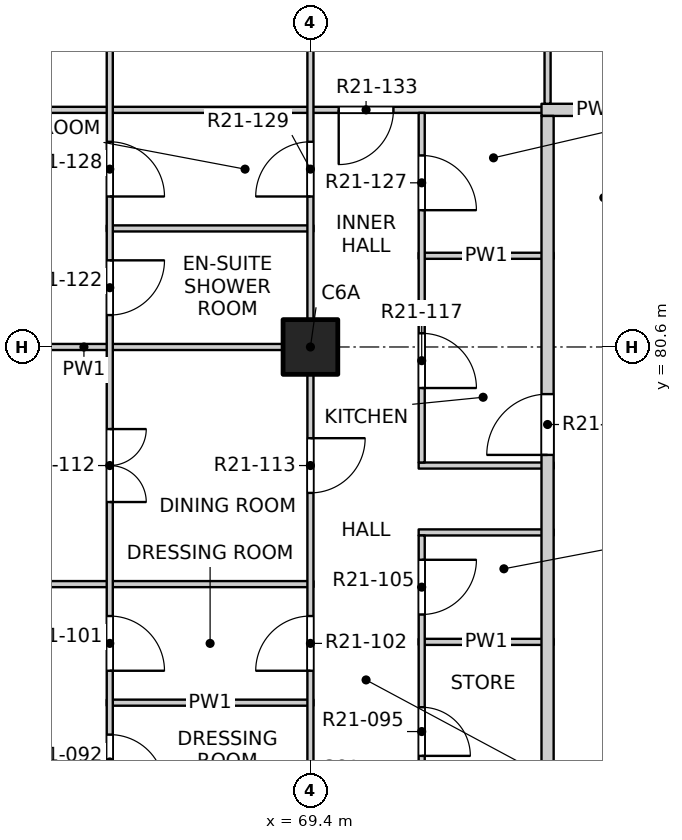
"""IFC4 building model, lengths in metres.
Left out: names, types, materials, properties, quantities, classifications, styles, units other than length and angle.
Written with IfcOpenShell. Run it as: python <this file> out.ifc"""

import sys

from ifc_helpers import new_model, si_unit, direction, frame, frame_2d, origin, origin_2d, place, context, subcontext, project, spatial, rectangle, extrude, element, fill, save


model = new_model("IFC4")
c1 = context("Model", 3, precision=1e-05, world=origin(), true_north=direction((0.0, 1.0)))
c2 = subcontext(c1, "Body", "Model", "MODEL_VIEW")
j1 = project(units=[si_unit("LENGTHUNIT", "METRE"), si_unit("PLANEANGLEUNIT", "RADIAN")], contexts=[c1])
p1 = place(None, origin())
s1 = spatial("IfcSite", under=j1, at=p1, CompositionType="ELEMENT")
p2 = place(p1, origin())
s2 = spatial("IfcBuilding", under=s1, at=p2, CompositionType="ELEMENT")
p3 = place(p2, frame((0.0, 0.0, 214.3)))
s3 = spatial("IfcBuildingStorey", under=s2, at=p3, CompositionType="ELEMENT", Elevation=214.3)
p4 = place(p3, frame((69.4, 80.6, -0.25), z_axis=(0.0, 0.0, 1.0), x_axis=(1.0, 0.0, 0.0)))
e1 = element("IfcColumn", 1, at=p4, inside=s3, PredefinedType="COLUMN", context=c2, shape_type="SweptSolid", body=[
    extrude(rectangle(XDim=0.9, YDim=0.9, at=origin_2d()), origin(), (0.0, 0.0, 1.0), 3.4),
])
p5 = place(p3, frame((66.05, 74.75, 0.0), z_axis=(0.0, 0.0, 1.0), x_axis=(1.0, 0.0, 0.0)))
e2 = element("IfcWall", 2, at=p5, inside=s3, PredefinedType="PARTITIONING", context=c2, shape_type="SweptSolid", body=[
    extrude(rectangle(XDim=3.4, YDim=0.1, at=frame_2d((1.7, 0.0))), origin(), (0.0, 0.0, 1.0), 3.15),
])
p6 = place(p3, frame((71.18, 75.75, 0.0), z_axis=(0.0, 0.0, 1.0), x_axis=(1.0, 0.0, 0.0)))
e3 = element("IfcWall", 3, at=p6, inside=s3, PredefinedType="PARTITIONING", context=c2, shape_type="SweptSolid", body=[
    extrude(rectangle(XDim=2.22, YDim=0.1, at=frame_2d((1.11, 0.0))), origin(), (0.0, 0.0, 1.0), 3.15),
])
p7 = place(p3, frame((61.9, 76.7, 0.0), z_axis=(0.0, 0.0, 1.0), x_axis=(1.0, 0.0, 0.0)))
e4 = element("IfcWall", 4, at=p7, inside=s3, PredefinedType="PARTITIONING", context=c2, shape_type="SweptSolid", body=[
    extrude(rectangle(XDim=7.55, YDim=0.1, at=frame_2d((3.775, 0.0))), origin(), (0.0, 0.0, 1.0), 2.55),
])
for number, where, z_axis, x_axis in (
    (5, (71.18, 77.55, 0.0), (0.0, 0.0, 1.0), (1.0, 0.0, 0.0)),
    (6, (71.18, 78.65, 0.0), (0.0, 0.0, 1.0), (1.0, 0.0, 0.0)),
):
    element("IfcWall", number, at=place(p3, frame(where, z_axis=z_axis, x_axis=x_axis)), inside=s3, PredefinedType="PARTITIONING", context=c2, shape_type="SweptSolid", body=[
        extrude(rectangle(XDim=2.22, YDim=0.1, at=frame_2d((1.11, 0.0))), origin(), (0.0, 0.0, 1.0), 3.15),
    ])
p8 = place(p3, frame((61.9, 80.6, 0.0), z_axis=(0.0, 0.0, 1.0), x_axis=(1.0, 0.0, 0.0)))
e7 = element("IfcWall", 7, at=p8, inside=s3, PredefinedType="PARTITIONING", context=c2, shape_type="SweptSolid", body=[
    extrude(rectangle(XDim=7.55, YDim=0.1, at=frame_2d((3.775, 0.0))), origin(), (0.0, 0.0, 1.0), 3.15),
])
p9 = place(p3, frame((71.18, 82.1, 0.0), z_axis=(0.0, 0.0, 1.0), x_axis=(1.0, 0.0, 0.0)))
e8 = element("IfcWall", 8, at=p9, inside=s3, PredefinedType="PARTITIONING", context=c2, shape_type="SweptSolid", body=[
    extrude(rectangle(XDim=2.22, YDim=0.1, at=frame_2d((1.11, 0.0))), origin(), (0.0, 0.0, 1.0), 3.15),
])
p10 = place(p3, frame((66.05, 82.55, 0.0), z_axis=(0.0, 0.0, 1.0), x_axis=(1.0, 0.0, 0.0)))
e9 = element("IfcWall", 9, at=p10, inside=s3, PredefinedType="PARTITIONING", context=c2, shape_type="SweptSolid", body=[
    extrude(rectangle(XDim=3.4, YDim=0.1, at=frame_2d((1.7, 0.0))), origin(), (0.0, 0.0, 1.0), 3.15),
])
p11 = place(p3, frame((61.9, 84.5, 0.0), z_axis=(0.0, 0.0, 1.0), x_axis=(1.0, 0.0, 0.0)))
e10 = element("IfcWall", 10, at=p11, inside=s3, PredefinedType="PARTITIONING", context=c2, shape_type="SweptSolid", body=[
    extrude(rectangle(XDim=11.5, YDim=0.1, at=frame_2d((5.75, 0.0))), origin(), (0.0, 0.0, 1.0), 3.15),
])
p12 = place(p11, frame((7.965, 0.0, 0.0)))
e11 = element("IfcOpeningElement", 11, at=p12, cuts=e10, PredefinedType="OPENING", context=c2, shape_type="SweptSolid", body=[
    extrude(rectangle(XDim=0.9, YDim=2.1, at=frame_2d((0.45, 1.05))), frame((0.0, 0.06, 0.0), z_axis=(0.0, -1.0, 0.0), x_axis=(1.0, 0.0, 0.0)), (0.0, 0.0, 1.0), 0.12),
])
p13 = place(p3, frame((73.2, 84.5, 0.0), z_axis=(0.0, 0.0, 1.0), x_axis=(1.0, 0.0, 0.0)))
e12 = element("IfcWall", 12, at=p13, inside=s3, PredefinedType="PARTITIONING", context=c2, shape_type="SweptSolid", body=[
    extrude(rectangle(XDim=1.85, YDim=0.2, at=frame_2d((0.925, 0.0))), origin(), (0.0, 0.0, 1.0), 3.15),
])
p14 = place(p3, frame((66.1, 61.2, 0.0), z_axis=(0.0, 0.0, 1.0), x_axis=(0.0, 1.0, 0.0)))
e13 = element("IfcWall", 13, at=p14, inside=s3, PredefinedType="PARTITIONING", context=c2, shape_type="SweptSolid", body=[
    extrude(rectangle(XDim=26.9, YDim=0.1, at=frame_2d((13.45, 0.0))), origin(), (0.0, 0.0, 1.0), 3.15),
])
p15 = place(p14, frame((1.25, 0.0, 0.0)))
e14 = element("IfcOpeningElement", 14, at=p15, cuts=e13, PredefinedType="OPENING", context=c2, shape_type="SweptSolid", body=[
    extrude(rectangle(XDim=1.2, YDim=2.1, at=frame_2d((0.6, 1.05))), frame((0.0, 0.06, 0.0), z_axis=(0.0, -1.0, 0.0), x_axis=(1.0, 0.0, 0.0)), (0.0, 0.0, 1.0), 0.12),
])
p16 = place(p14, frame((5.15, 0.0, 0.0)))
e15 = element("IfcOpeningElement", 15, at=p16, cuts=e13, PredefinedType="OPENING", context=c2, shape_type="SweptSolid", body=[
    extrude(rectangle(XDim=1.2, YDim=2.1, at=frame_2d((0.6, 1.05))), frame((0.0, 0.06, 0.0), z_axis=(0.0, -1.0, 0.0), x_axis=(1.0, 0.0, 0.0)), (0.0, 0.0, 1.0), 0.12),
])
p17 = place(p14, frame((8.225, 0.0, 0.0)))
e16 = element("IfcOpeningElement", 16, at=p17, cuts=e13, PredefinedType="OPENING", context=c2, shape_type="SweptSolid", body=[
    extrude(rectangle(XDim=0.9, YDim=2.1, at=frame_2d((0.45, 1.05))), frame((0.0, 0.06, 0.0), z_axis=(0.0, -1.0, 0.0), x_axis=(1.0, 0.0, 0.0)), (0.0, 0.0, 1.0), 0.12),
])
p18 = place(p14, frame((10.175, 0.0, 0.0)))
e17 = element("IfcOpeningElement", 17, at=p18, cuts=e13, PredefinedType="OPENING", context=c2, shape_type="SweptSolid", body=[
    extrude(rectangle(XDim=0.9, YDim=2.1, at=frame_2d((0.45, 1.05))), frame((0.0, 0.06, 0.0), z_axis=(0.0, -1.0, 0.0), x_axis=(1.0, 0.0, 0.0)), (0.0, 0.0, 1.0), 0.12),
])
p19 = place(p14, frame((12.125, 0.0, 0.0)))
e18 = element("IfcOpeningElement", 18, at=p19, cuts=e13, PredefinedType="OPENING", context=c2, shape_type="SweptSolid", body=[
    extrude(rectangle(XDim=0.9, YDim=2.1, at=frame_2d((0.45, 1.05))), frame((0.0, 0.06, 0.0), z_axis=(0.0, -1.0, 0.0), x_axis=(1.0, 0.0, 0.0)), (0.0, 0.0, 1.0), 0.12),
])
p20 = place(p14, frame((14.075, 0.0, 0.0)))
e19 = element("IfcOpeningElement", 19, at=p20, cuts=e13, PredefinedType="OPENING", context=c2, shape_type="SweptSolid", body=[
    extrude(rectangle(XDim=0.9, YDim=2.1, at=frame_2d((0.45, 1.05))), frame((0.0, 0.06, 0.0), z_axis=(0.0, -1.0, 0.0), x_axis=(1.0, 0.0, 0.0)), (0.0, 0.0, 1.0), 0.12),
])
p21 = place(p14, frame((16.85, 0.0, 0.0)))
e20 = element("IfcOpeningElement", 20, at=p21, cuts=e13, PredefinedType="OPENING", context=c2, shape_type="SweptSolid", body=[
    extrude(rectangle(XDim=1.2, YDim=2.1, at=frame_2d((0.6, 1.05))), frame((0.0, 0.06, 0.0), z_axis=(0.0, -1.0, 0.0), x_axis=(1.0, 0.0, 0.0)), (0.0, 0.0, 1.0), 0.12),
])
p22 = place(p14, frame((19.925, 0.0, 0.0)))
e21 = element("IfcOpeningElement", 21, at=p22, cuts=e13, PredefinedType="OPENING", context=c2, shape_type="SweptSolid", body=[
    extrude(rectangle(XDim=0.9, YDim=2.1, at=frame_2d((0.45, 1.05))), frame((0.0, 0.06, 0.0), z_axis=(0.0, -1.0, 0.0), x_axis=(1.0, 0.0, 0.0)), (0.0, 0.0, 1.0), 0.12),
])
p23 = place(p14, frame((21.875, 0.0, 0.0)))
e22 = element("IfcOpeningElement", 22, at=p23, cuts=e13, PredefinedType="OPENING", context=c2, shape_type="SweptSolid", body=[
    extrude(rectangle(XDim=0.9, YDim=2.1, at=frame_2d((0.45, 1.05))), frame((0.0, 0.06, 0.0), z_axis=(0.0, -1.0, 0.0), x_axis=(1.0, 0.0, 0.0)), (0.0, 0.0, 1.0), 0.12),
])
p24 = place(p14, frame((24.65, 0.0, 0.0)))
e23 = element("IfcOpeningElement", 23, at=p24, cuts=e13, PredefinedType="OPENING", context=c2, shape_type="SweptSolid", body=[
    extrude(rectangle(XDim=1.2, YDim=2.1, at=frame_2d((0.6, 1.05))), frame((0.0, 0.06, 0.0), z_axis=(0.0, -1.0, 0.0), x_axis=(1.0, 0.0, 0.0)), (0.0, 0.0, 1.0), 0.12),
])
p25 = place(p3, frame((69.4, 41.9, 0.0), z_axis=(0.0, 0.0, 1.0), x_axis=(0.0, 1.0, 0.0)))
e24 = element("IfcWall", 24, at=p25, inside=s3, PredefinedType="PARTITIONING", context=c2, shape_type="SweptSolid", body=[
    extrude(rectangle(XDim=46.2, YDim=0.1, at=frame_2d((23.1, 0.0))), origin(), (0.0, 0.0, 1.0), 3.15),
])
p26 = place(p25, frame((1.2, 0.0, 0.0)))
e25 = element("IfcOpeningElement", 25, at=p26, cuts=e24, PredefinedType="OPENING", context=c2, shape_type="SweptSolid", body=[
    extrude(rectangle(XDim=0.9, YDim=2.1, at=frame_2d((0.45, 1.05))), frame((0.0, 0.06, 0.0), z_axis=(0.0, -1.0, 0.0), x_axis=(1.0, 0.0, 0.0)), (0.0, 0.0, 1.0), 0.12),
])
p27 = place(p25, frame((6.025, 0.0, 0.0)))
e26 = element("IfcOpeningElement", 26, at=p27, cuts=e24, PredefinedType="OPENING", context=c2, shape_type="SweptSolid", body=[
    extrude(rectangle(XDim=0.9, YDim=2.1, at=frame_2d((0.45, 1.05))), frame((0.0, 0.06, 0.0), z_axis=(0.0, -1.0, 0.0), x_axis=(1.0, 0.0, 0.0)), (0.0, 0.0, 1.0), 0.12),
])
p28 = place(p25, frame((9.0, 0.0, 0.0)))
e27 = element("IfcOpeningElement", 27, at=p28, cuts=e24, PredefinedType="OPENING", context=c2, shape_type="SweptSolid", body=[
    extrude(rectangle(XDim=0.9, YDim=2.1, at=frame_2d((0.45, 1.05))), frame((0.0, 0.06, 0.0), z_axis=(0.0, -1.0, 0.0), x_axis=(1.0, 0.0, 0.0)), (0.0, 0.0, 1.0), 0.12),
])
p29 = place(p25, frame((12.9, 0.0, 0.0)))
e28 = element("IfcOpeningElement", 28, at=p29, cuts=e24, PredefinedType="OPENING", context=c2, shape_type="SweptSolid", body=[
    extrude(rectangle(XDim=0.9, YDim=2.1, at=frame_2d((0.45, 1.05))), frame((0.0, 0.06, 0.0), z_axis=(0.0, -1.0, 0.0), x_axis=(1.0, 0.0, 0.0)), (0.0, 0.0, 1.0), 0.12),
])
p30 = place(p25, frame((17.775, 0.0, 0.0)))
e29 = element("IfcOpeningElement", 29, at=p30, cuts=e24, PredefinedType="OPENING", context=c2, shape_type="SweptSolid", body=[
    extrude(rectangle(XDim=0.9, YDim=2.1, at=frame_2d((0.45, 1.05))), frame((0.0, 0.06, 0.0), z_axis=(0.0, -1.0, 0.0), x_axis=(1.0, 0.0, 0.0)), (0.0, 0.0, 1.0), 0.12),
])
p31 = place(p25, frame((20.7, 0.0, 0.0)))
e30 = element("IfcOpeningElement", 30, at=p31, cuts=e24, PredefinedType="OPENING", context=c2, shape_type="SweptSolid", body=[
    extrude(rectangle(XDim=0.9, YDim=2.1, at=frame_2d((0.45, 1.05))), frame((0.0, 0.06, 0.0), z_axis=(0.0, -1.0, 0.0), x_axis=(1.0, 0.0, 0.0)), (0.0, 0.0, 1.0), 0.12),
])
p32 = place(p25, frame((24.6, 0.0, 0.0)))
e31 = element("IfcOpeningElement", 31, at=p32, cuts=e24, PredefinedType="OPENING", context=c2, shape_type="SweptSolid", body=[
    extrude(rectangle(XDim=0.9, YDim=2.1, at=frame_2d((0.45, 1.05))), frame((0.0, 0.06, 0.0), z_axis=(0.0, -1.0, 0.0), x_axis=(1.0, 0.0, 0.0)), (0.0, 0.0, 1.0), 0.12),
])
p33 = place(p25, frame((29.425, 0.0, 0.0)))
e32 = element("IfcOpeningElement", 32, at=p33, cuts=e24, PredefinedType="OPENING", context=c2, shape_type="SweptSolid", body=[
    extrude(rectangle(XDim=0.9, YDim=2.1, at=frame_2d((0.45, 1.05))), frame((0.0, 0.06, 0.0), z_axis=(0.0, -1.0, 0.0), x_axis=(1.0, 0.0, 0.0)), (0.0, 0.0, 1.0), 0.12),
])
p34 = place(p25, frame((33.375, 0.0, 0.0)))
e33 = element("IfcOpeningElement", 33, at=p34, cuts=e24, PredefinedType="OPENING", context=c2, shape_type="SweptSolid", body=[
    extrude(rectangle(XDim=0.9, YDim=2.1, at=frame_2d((0.45, 1.05))), frame((0.0, 0.06, 0.0), z_axis=(0.0, -1.0, 0.0), x_axis=(1.0, 0.0, 0.0)), (0.0, 0.0, 1.0), 0.12),
])
p35 = place(p25, frame((36.3, 0.0, 0.0)))
e34 = element("IfcOpeningElement", 34, at=p35, cuts=e24, PredefinedType="OPENING", context=c2, shape_type="SweptSolid", body=[
    extrude(rectangle(XDim=0.9, YDim=2.1, at=frame_2d((0.45, 1.05))), frame((0.0, 0.06, 0.0), z_axis=(0.0, -1.0, 0.0), x_axis=(1.0, 0.0, 0.0)), (0.0, 0.0, 1.0), 0.12),
])
p36 = place(p25, frame((41.175, 0.0, 0.0)))
e35 = element("IfcOpeningElement", 35, at=p36, cuts=e24, PredefinedType="OPENING", context=c2, shape_type="SweptSolid", body=[
    extrude(rectangle(XDim=0.9, YDim=2.1, at=frame_2d((0.45, 1.05))), frame((0.0, 0.06, 0.0), z_axis=(0.0, -1.0, 0.0), x_axis=(1.0, 0.0, 0.0)), (0.0, 0.0, 1.0), 0.12),
])
p37 = place(p25, frame((44.1, 0.0, 0.0)))
e36 = element("IfcOpeningElement", 36, at=p37, cuts=e24, PredefinedType="OPENING", context=c2, shape_type="SweptSolid", body=[
    extrude(rectangle(XDim=0.9, YDim=2.1, at=frame_2d((0.45, 1.05))), frame((0.0, 0.06, 0.0), z_axis=(0.0, -1.0, 0.0), x_axis=(1.0, 0.0, 0.0)), (0.0, 0.0, 1.0), 0.12),
])
p38 = place(p3, frame((71.23, 68.25, 0.0), z_axis=(0.0, 0.0, 1.0), x_axis=(0.0, 1.0, 0.0)))
e37 = element("IfcWall", 37, at=p38, inside=s3, PredefinedType="PARTITIONING", context=c2, shape_type="SweptSolid", body=[
    extrude(rectangle(XDim=9.25, YDim=0.1, at=frame_2d((4.625, 0.0))), origin(), (0.0, 0.0, 1.0), 3.15),
])
p39 = place(p38, frame((0.625, 0.0, 0.0)))
e38 = element("IfcOpeningElement", 38, at=p39, cuts=e37, PredefinedType="OPENING", context=c2, shape_type="SweptSolid", body=[
    extrude(rectangle(XDim=0.9, YDim=2.1, at=frame_2d((0.45, 1.05))), frame((0.0, 0.06, 0.0), z_axis=(0.0, -1.0, 0.0), x_axis=(1.0, 0.0, 0.0)), (0.0, 0.0, 1.0), 0.12),
])
p40 = place(p38, frame((2.975, 0.0, 0.0)))
e39 = element("IfcOpeningElement", 39, at=p40, cuts=e37, PredefinedType="OPENING", context=c2, shape_type="SweptSolid", body=[
    extrude(rectangle(XDim=0.8, YDim=2.1, at=frame_2d((0.4, 1.05))), frame((0.0, 0.06, 0.0), z_axis=(0.0, -1.0, 0.0), x_axis=(1.0, 0.0, 0.0)), (0.0, 0.0, 1.0), 0.12),
])
p41 = place(p38, frame((5.625, 0.0, 0.0)))
e40 = element("IfcOpeningElement", 40, at=p41, cuts=e37, PredefinedType="OPENING", context=c2, shape_type="SweptSolid", body=[
    extrude(rectangle(XDim=0.8, YDim=2.1, at=frame_2d((0.4, 1.05))), frame((0.0, 0.06, 0.0), z_axis=(0.0, -1.0, 0.0), x_axis=(1.0, 0.0, 0.0)), (0.0, 0.0, 1.0), 0.12),
])
p42 = place(p38, frame((7.95, 0.0, 0.0)))
e41 = element("IfcOpeningElement", 41, at=p42, cuts=e37, PredefinedType="OPENING", context=c2, shape_type="SweptSolid", body=[
    extrude(rectangle(XDim=0.9, YDim=2.1, at=frame_2d((0.45, 1.05))), frame((0.0, 0.06, 0.0), z_axis=(0.0, -1.0, 0.0), x_axis=(1.0, 0.0, 0.0)), (0.0, 0.0, 1.0), 0.12),
])
p43 = place(p3, frame((71.23, 78.7, 0.0), z_axis=(0.0, 0.0, 1.0), x_axis=(0.0, 1.0, 0.0)))
e42 = element("IfcWall", 42, at=p43, inside=s3, PredefinedType="PARTITIONING", context=c2, shape_type="SweptSolid", body=[
    extrude(rectangle(XDim=5.75, YDim=0.1, at=frame_2d((2.875, 0.0))), origin(), (0.0, 0.0, 1.0), 3.15),
])
p44 = place(p43, frame((1.225, 0.0, 0.0)))
e43 = element("IfcOpeningElement", 43, at=p44, cuts=e42, PredefinedType="OPENING", context=c2, shape_type="SweptSolid", body=[
    extrude(rectangle(XDim=0.9, YDim=2.1, at=frame_2d((0.45, 1.05))), frame((0.0, 0.06, 0.0), z_axis=(0.0, -1.0, 0.0), x_axis=(1.0, 0.0, 0.0)), (0.0, 0.0, 1.0), 0.12),
])
p45 = place(p43, frame((4.15, 0.0, 0.0)))
e44 = element("IfcOpeningElement", 44, at=p45, cuts=e42, PredefinedType="OPENING", context=c2, shape_type="SweptSolid", body=[
    extrude(rectangle(XDim=0.9, YDim=2.1, at=frame_2d((0.45, 1.05))), frame((0.0, 0.06, 0.0), z_axis=(0.0, -1.0, 0.0), x_axis=(1.0, 0.0, 0.0)), (0.0, 0.0, 1.0), 0.12),
])
p46 = place(p3, frame((73.3, 49.5, 0.0), z_axis=(0.0, 0.0, 1.0), x_axis=(0.0, 1.0, 0.0)))
e45 = element("IfcWall", 45, at=p46, inside=s3, PredefinedType="PARTITIONING", context=c2, shape_type="SweptSolid", body=[
    extrude(rectangle(XDim=34.9, YDim=0.2, at=frame_2d((17.45, 0.0))), origin(), (0.0, 0.0, 1.0), 3.15),
])
p47 = place(p46, frame((3.325, 0.0, 0.0)))
e46 = element("IfcOpeningElement", 46, at=p47, cuts=e45, PredefinedType="OPENING", context=c2, shape_type="SweptSolid", body=[
    extrude(rectangle(XDim=1.0, YDim=2.1, at=frame_2d((0.5, 1.05))), frame((0.0, 0.11, 0.0), z_axis=(0.0, -1.0, 0.0), x_axis=(1.0, 0.0, 0.0)), (0.0, 0.0, 1.0), 0.22),
])
p48 = place(p46, frame((18.875, 0.0, 0.0)))
e47 = element("IfcOpeningElement", 47, at=p48, cuts=e45, PredefinedType="OPENING", context=c2, shape_type="SweptSolid", body=[
    extrude(rectangle(XDim=1.0, YDim=2.1, at=frame_2d((0.5, 1.05))), frame((0.0, 0.11, 0.0), z_axis=(0.0, -1.0, 0.0), x_axis=(1.0, 0.0, 0.0)), (0.0, 0.0, 1.0), 0.22),
])
p49 = place(p46, frame((29.325, 0.0, 0.0)))
e48 = element("IfcOpeningElement", 48, at=p49, cuts=e45, PredefinedType="OPENING", context=c2, shape_type="SweptSolid", body=[
    extrude(rectangle(XDim=1.0, YDim=2.1, at=frame_2d((0.5, 1.05))), frame((0.0, 0.11, 0.0), z_axis=(0.0, -1.0, 0.0), x_axis=(1.0, 0.0, 0.0)), (0.0, 0.0, 1.0), 0.22),
])
p50 = place(p3, frame((73.3, 84.6, 0.0), z_axis=(0.0, 0.0, 1.0), x_axis=(0.0, 1.0, 0.0)))
e49 = element("IfcWall", 49, at=p50, inside=s3, PredefinedType="PARTITIONING", context=c2, shape_type="SweptSolid", body=[
    extrude(rectangle(XDim=3.5, YDim=0.1, at=frame_2d((1.75, 0.0))), origin(), (0.0, 0.0, 1.0), 3.15),
])
p51 = place(p50, frame((1.4, 0.0, 0.0)))
e50 = element("IfcOpeningElement", 50, at=p51, cuts=e49, PredefinedType="OPENING", context=c2, shape_type="SweptSolid", body=[
    extrude(rectangle(XDim=0.9, YDim=2.1, at=frame_2d((0.45, 1.05))), frame((0.0, 0.06, 0.0), z_axis=(0.0, -1.0, 0.0), x_axis=(1.0, 0.0, 0.0)), (0.0, 0.0, 1.0), 0.12),
])
p52 = place(p19, origin())
e51 = element("IfcDoor", 51, at=p52, inside=s3, OperationType="SINGLE_SWING_RIGHT", PredefinedType="DOOR", context=c2, shape_type="SweptSolid", body=[
    extrude(rectangle(XDim=0.9, YDim=2.1, at=frame_2d((0.45, 1.05))), frame((0.0, 0.025, 0.0), z_axis=(0.0, -1.0, 0.0), x_axis=(1.0, 0.0, 0.0)), (0.0, 0.0, 1.0), 0.05),
])
fill(e18, e51)
p53 = place(p41, origin())
e52 = element("IfcDoor", 52, at=p53, inside=s3, OperationType="SINGLE_SWING_RIGHT", PredefinedType="DOOR", context=c2, shape_type="SweptSolid", body=[
    extrude(rectangle(XDim=0.8, YDim=2.1, at=frame_2d((0.4, 1.05))), frame((0.0, 0.025, 0.0), z_axis=(0.0, -1.0, 0.0), x_axis=(1.0, 0.0, 0.0)), (0.0, 0.0, 1.0), 0.05),
])
fill(e40, e52)
p54 = place(p20, origin())
e53 = element("IfcDoor", 53, at=p54, inside=s3, OperationType="SINGLE_SWING_RIGHT", PredefinedType="DOOR", context=c2, shape_type="SweptSolid", body=[
    extrude(rectangle(XDim=0.9, YDim=2.1, at=frame_2d((0.45, 1.05))), frame((0.0, 0.025, 0.0), z_axis=(0.0, -1.0, 0.0), x_axis=(1.0, 0.0, 0.0)), (0.0, 0.0, 1.0), 0.05),
])
fill(e19, e53)
p55 = place(p34, origin())
e54 = element("IfcDoor", 54, at=p55, inside=s3, OperationType="SINGLE_SWING_LEFT", PredefinedType="DOOR", context=c2, shape_type="SweptSolid", body=[
    extrude(rectangle(XDim=0.9, YDim=2.1, at=frame_2d((0.45, 1.05))), frame((0.0, 0.025, 0.0), z_axis=(0.0, -1.0, 0.0), x_axis=(1.0, 0.0, 0.0)), (0.0, 0.0, 1.0), 0.05),
])
fill(e33, e54)
p56 = place(p42, origin())
e55 = element("IfcDoor", 55, at=p56, inside=s3, OperationType="SINGLE_SWING_LEFT", PredefinedType="DOOR", context=c2, shape_type="SweptSolid", body=[
    extrude(rectangle(XDim=0.9, YDim=2.1, at=frame_2d((0.45, 1.05))), frame((0.0, 0.025, 0.0), z_axis=(0.0, -1.0, 0.0), x_axis=(1.0, 0.0, 0.0)), (0.0, 0.0, 1.0), 0.05),
])
fill(e41, e55)
p57 = place(p21, origin())
e56 = element("IfcDoor", 56, at=p57, inside=s3, OperationType="DOUBLE_DOOR_SINGLE_SWING", PredefinedType="DOOR", context=c2, shape_type="SweptSolid", body=[
    extrude(rectangle(XDim=1.2, YDim=2.1, at=frame_2d((0.6, 1.05))), frame((0.0, 0.025, 0.0), z_axis=(0.0, -1.0, 0.0), x_axis=(1.0, 0.0, 0.0)), (0.0, 0.0, 1.0), 0.05),
])
fill(e20, e56)
p58 = place(p35, origin())
e57 = element("IfcDoor", 57, at=p58, inside=s3, OperationType="SINGLE_SWING_LEFT", PredefinedType="DOOR", context=c2, shape_type="SweptSolid", body=[
    extrude(rectangle(XDim=0.9, YDim=2.1, at=frame_2d((0.45, 1.05))), frame((0.0, 0.025, 0.0), z_axis=(0.0, -1.0, 0.0), x_axis=(1.0, 0.0, 0.0)), (0.0, 0.0, 1.0), 0.05),
])
fill(e34, e57)
p59 = place(p49, origin())
e58 = element("IfcDoor", 58, at=p59, inside=s3, OperationType="SINGLE_SWING_RIGHT", PredefinedType="DOOR", context=c2, shape_type="SweptSolid", body=[
    extrude(rectangle(XDim=1.0, YDim=2.1, at=frame_2d((0.5, 1.05))), frame((0.0, 0.025, 0.0), z_axis=(0.0, -1.0, 0.0), x_axis=(1.0, 0.0, 0.0)), (0.0, 0.0, 1.0), 0.05),
])
fill(e48, e58)
p60 = place(p44, origin())
e59 = element("IfcDoor", 59, at=p60, inside=s3, OperationType="SINGLE_SWING_RIGHT", PredefinedType="DOOR", context=c2, shape_type="SweptSolid", body=[
    extrude(rectangle(XDim=0.9, YDim=2.1, at=frame_2d((0.45, 1.05))), frame((0.0, 0.025, 0.0), z_axis=(0.0, -1.0, 0.0), x_axis=(1.0, 0.0, 0.0)), (0.0, 0.0, 1.0), 0.05),
])
fill(e43, e59)
p61 = place(p22, origin())
e60 = element("IfcDoor", 60, at=p61, inside=s3, OperationType="SINGLE_SWING_LEFT", PredefinedType="DOOR", context=c2, shape_type="SweptSolid", body=[
    extrude(rectangle(XDim=0.9, YDim=2.1, at=frame_2d((0.45, 1.05))), frame((0.0, 0.025, 0.0), z_axis=(0.0, -1.0, 0.0), x_axis=(1.0, 0.0, 0.0)), (0.0, 0.0, 1.0), 0.05),
])
fill(e21, e60)
p62 = place(p45, origin())
e61 = element("IfcDoor", 61, at=p62, inside=s3, OperationType="SINGLE_SWING_RIGHT", PredefinedType="DOOR", context=c2, shape_type="SweptSolid", body=[
    extrude(rectangle(XDim=0.9, YDim=2.1, at=frame_2d((0.45, 1.05))), frame((0.0, 0.025, 0.0), z_axis=(0.0, -1.0, 0.0), x_axis=(1.0, 0.0, 0.0)), (0.0, 0.0, 1.0), 0.05),
])
fill(e44, e61)
p63 = place(p23, origin())
e62 = element("IfcDoor", 62, at=p63, inside=s3, OperationType="SINGLE_SWING_RIGHT", PredefinedType="DOOR", context=c2, shape_type="SweptSolid", body=[
    extrude(rectangle(XDim=0.9, YDim=2.1, at=frame_2d((0.45, 1.05))), frame((0.0, 0.025, 0.0), z_axis=(0.0, -1.0, 0.0), x_axis=(1.0, 0.0, 0.0)), (0.0, 0.0, 1.0), 0.05),
])
fill(e22, e62)
p64 = place(p36, origin())
e63 = element("IfcDoor", 63, at=p64, inside=s3, OperationType="SINGLE_SWING_LEFT", PredefinedType="DOOR", context=c2, shape_type="SweptSolid", body=[
    extrude(rectangle(XDim=0.9, YDim=2.1, at=frame_2d((0.45, 1.05))), frame((0.0, 0.025, 0.0), z_axis=(0.0, -1.0, 0.0), x_axis=(1.0, 0.0, 0.0)), (0.0, 0.0, 1.0), 0.05),
])
fill(e35, e63)
p65 = place(p12, origin())
e64 = element("IfcDoor", 64, at=p65, inside=s3, OperationType="SINGLE_SWING_RIGHT", PredefinedType="DOOR", context=c2, shape_type="SweptSolid", body=[
    extrude(rectangle(XDim=0.9, YDim=2.1, at=frame_2d((0.45, 1.05))), frame((0.0, 0.025, 0.0), z_axis=(0.0, -1.0, 0.0), x_axis=(1.0, 0.0, 0.0)), (0.0, 0.0, 1.0), 0.05),
])
fill(e11, e64)
save(model, sys.argv[1])
